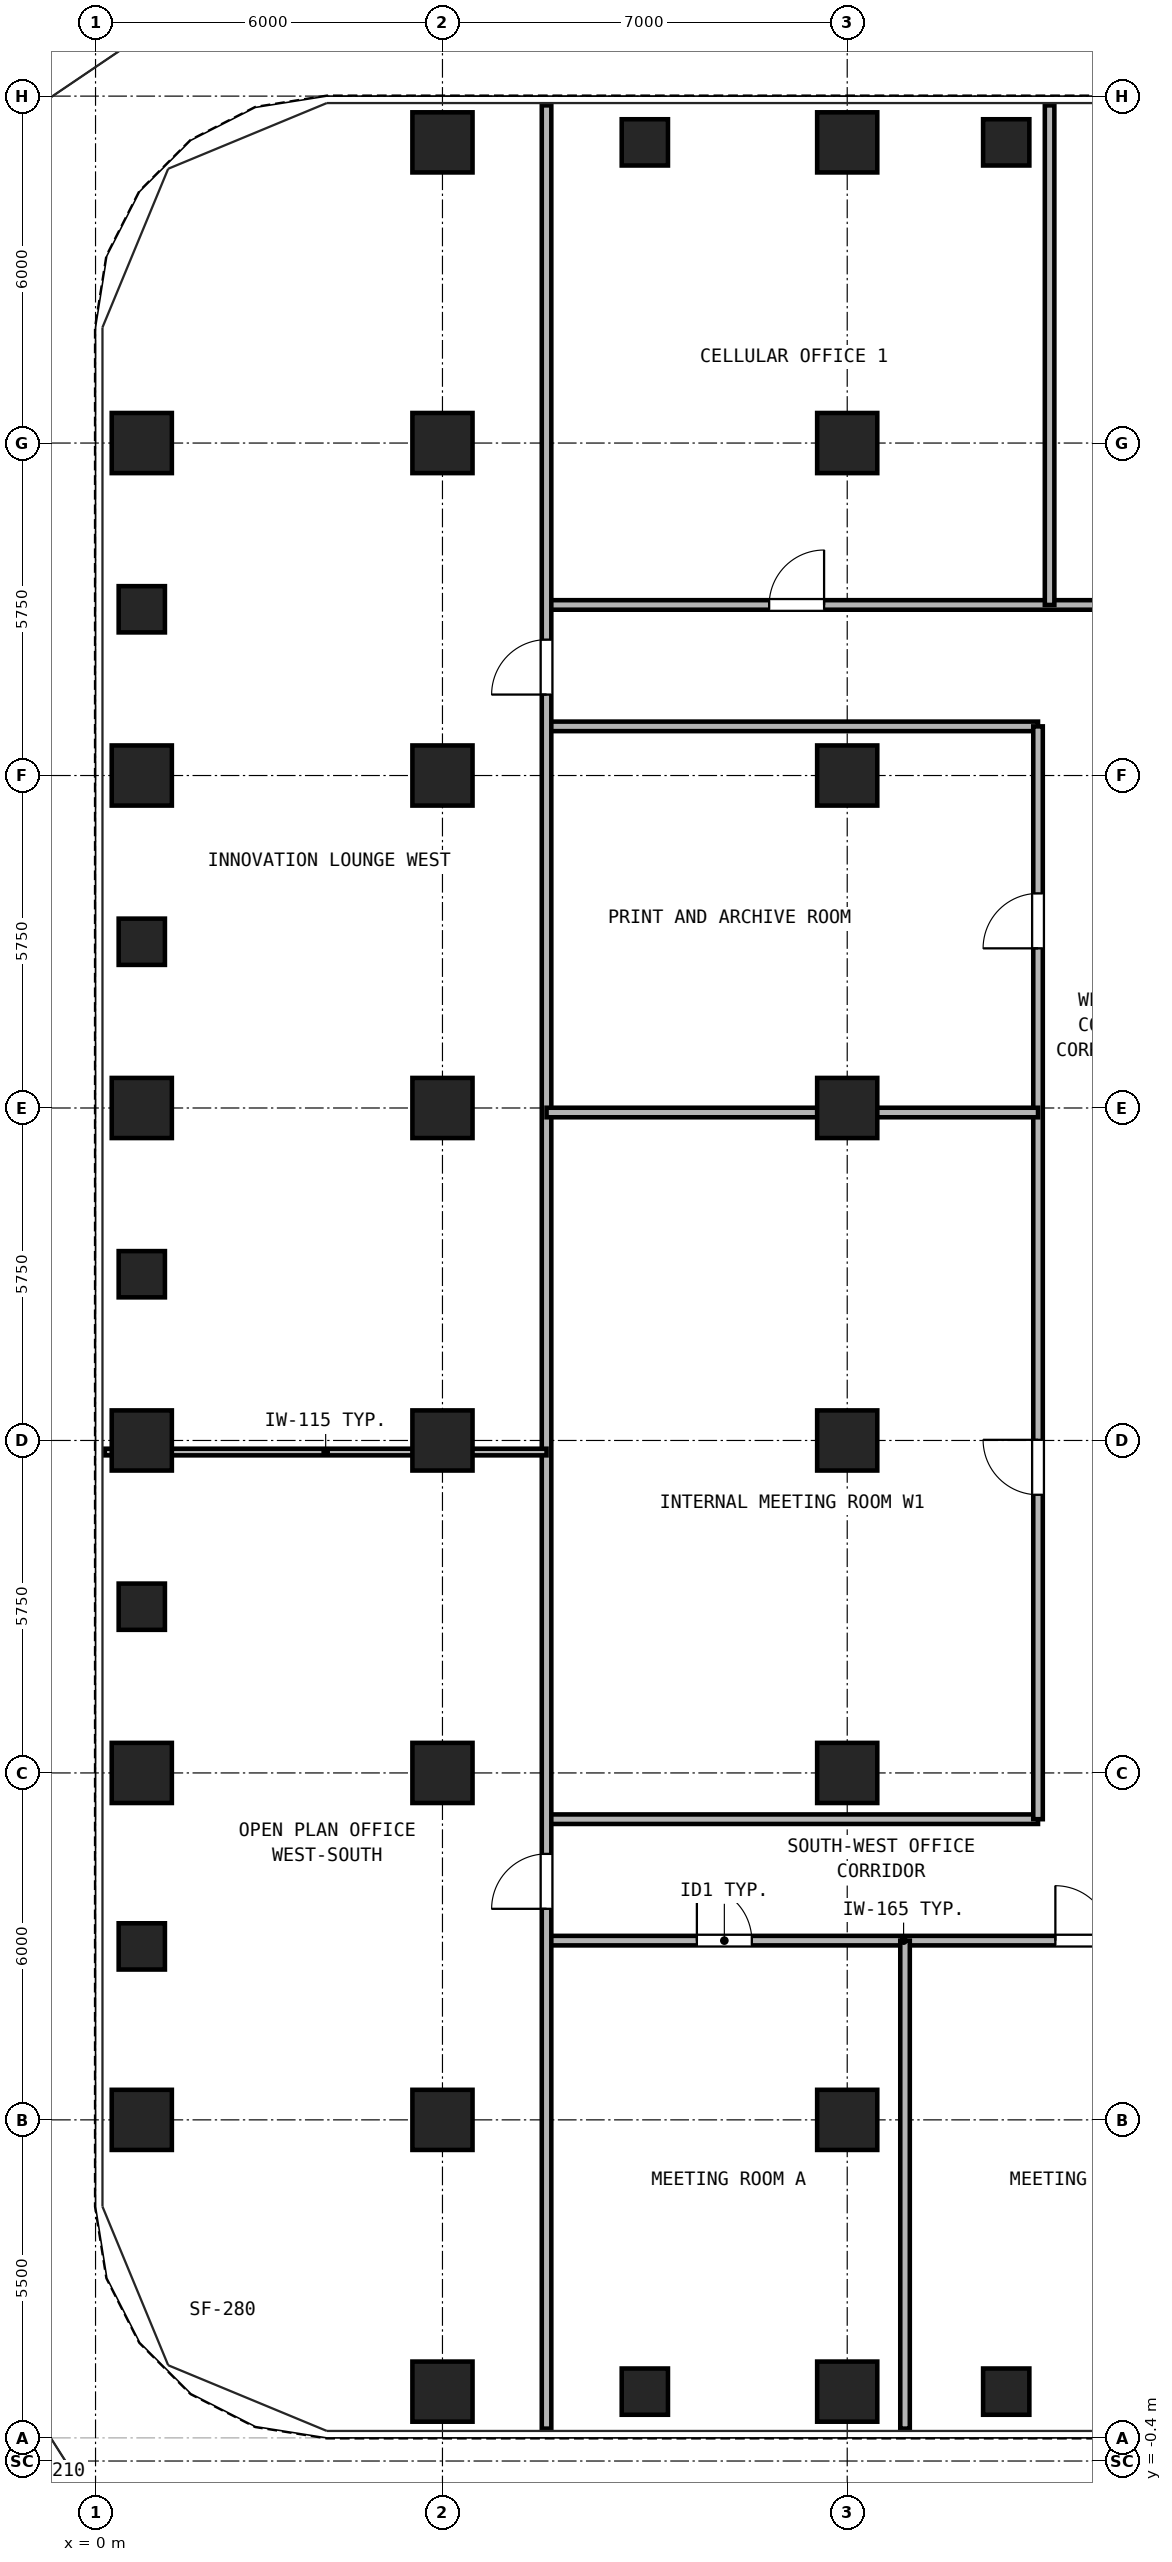
"""IFC4 building model, lengths in metres.
Left out: names, types, materials, properties, quantities, classifications, styles, units other than length and angle.
Written with IfcOpenShell. Run it as: python <this file> out.ifc"""

import sys

from ifc_helpers import new_model, si_unit, direction, frame, frame_2d, origin, origin_2d, place, context, subcontext, project, spatial, rectangle, hollow_rectangle, extrude, source, transform, mapped, element, fill, save


model = new_model("IFC4")
c1 = context("Model", 3, precision=1e-05, world=origin(), true_north=direction((0.0, 1.0)))
c2 = subcontext(c1, "Body", "Model", "MODEL_VIEW")
j1 = project(units=[si_unit("LENGTHUNIT", "METRE"), si_unit("PLANEANGLEUNIT", "RADIAN")], contexts=[c1])
p1 = place(None, origin())
s1 = spatial("IfcSite", under=j1, at=p1, CompositionType="ELEMENT")
p2 = place(p1, origin())
s2 = spatial("IfcBuilding", under=s1, at=p2, CompositionType="ELEMENT")
p3 = place(p2, frame((0.0, 0.0, 65.7)))
s3 = spatial("IfcBuildingStorey", under=s2, at=p3, CompositionType="ELEMENT", Elevation=65.7)
m1 = source(origin(), c2, "Body", "SweptSolid", [
    extrude(hollow_rectangle(XDim=1.04, YDim=1.04, WallThickness=0.065, at=origin_2d()), origin(), (0.0, 0.0, 1.0), 3.32),
])
for number, where, z_axis, x_axis in (
    (1, (6.0, 0.8, 0.0), (0.0, 0.0, 1.0), (1.0, 0.0, 0.0)),
    (2, (6.0, 39.7, 0.0), (0.0, 0.0, 1.0), (1.0, 0.0, 0.0)),
    (3, (13.0, 0.8, 0.0), (0.0, 0.0, 1.0), (1.0, 0.0, 0.0)),
    (4, (13.0, 39.7, 0.0), (0.0, 0.0, 1.0), (1.0, 0.0, 0.0)),
    (5, (0.8, 5.5, 0.0), (0.0, 0.0, 1.0), (1.0, 0.0, 0.0)),
    (6, (0.8, 11.5, 0.0), (0.0, 0.0, 1.0), (1.0, 0.0, 0.0)),
    (7, (0.8, 17.25, 0.0), (0.0, 0.0, 1.0), (1.0, 0.0, 0.0)),
    (8, (0.8, 23.0, 0.0), (0.0, 0.0, 1.0), (1.0, 0.0, 0.0)),
    (9, (0.8, 28.75, 0.0), (0.0, 0.0, 1.0), (1.0, 0.0, 0.0)),
    (10, (0.8, 34.5, 0.0), (0.0, 0.0, 1.0), (1.0, 0.0, 0.0)),
    (11, (6.0, 5.5, 0.0), (0.0, 0.0, 1.0), (1.0, 0.0, 0.0)),
    (12, (6.0, 11.5, 0.0), (0.0, 0.0, 1.0), (1.0, 0.0, 0.0)),
    (13, (6.0, 17.25, 0.0), (0.0, 0.0, 1.0), (1.0, 0.0, 0.0)),
    (14, (6.0, 23.0, 0.0), (0.0, 0.0, 1.0), (1.0, 0.0, 0.0)),
    (15, (6.0, 28.75, 0.0), (0.0, 0.0, 1.0), (1.0, 0.0, 0.0)),
    (16, (6.0, 34.5, 0.0), (0.0, 0.0, 1.0), (1.0, 0.0, 0.0)),
    (17, (13.0, 5.5, 0.0), (0.0, 0.0, 1.0), (1.0, 0.0, 0.0)),
    (18, (13.0, 11.5, 0.0), (0.0, 0.0, 1.0), (1.0, 0.0, 0.0)),
    (19, (13.0, 17.25, 0.0), (0.0, 0.0, 1.0), (1.0, 0.0, 0.0)),
    (20, (13.0, 23.0, 0.0), (0.0, 0.0, 1.0), (1.0, 0.0, 0.0)),
    (21, (13.0, 28.75, 0.0), (0.0, 0.0, 1.0), (1.0, 0.0, 0.0)),
    (22, (13.0, 34.5, 0.0), (0.0, 0.0, 1.0), (1.0, 0.0, 0.0)),
):
    element("IfcColumn", number, at=place(p3, frame(where, z_axis=z_axis, x_axis=x_axis)), inside=s3, PredefinedType="COLUMN", context=c2, shape_type="MappedRepresentation", body=[
        mapped(m1, transform((0.0, 0.0, 0.0), x_axis=(1.0, 0.0, 0.0), y_axis=(0.0, 1.0, 0.0), z_axis=(0.0, 0.0, 1.0), scale=1.0)),
    ])
m2 = source(origin(), c2, "Body", "SweptSolid", [
    extrude(hollow_rectangle(XDim=0.8, YDim=0.8, WallThickness=0.045, at=origin_2d()), origin(), (0.0, 0.0, 1.0), 3.32),
])
for number, where, z_axis, x_axis in (
    (23, (9.5, 0.8, 0.0), (0.0, 0.0, 1.0), (1.0, 0.0, 0.0)),
    (24, (9.5, 39.7, 0.0), (0.0, 0.0, 1.0), (1.0, 0.0, 0.0)),
    (25, (15.75, 0.8, 0.0), (0.0, 0.0, 1.0), (1.0, 0.0, 0.0)),
    (26, (15.75, 39.7, 0.0), (0.0, 0.0, 1.0), (1.0, 0.0, 0.0)),
    (27, (0.8, 8.5, 0.0), (0.0, 0.0, 1.0), (1.0, 0.0, 0.0)),
    (28, (0.8, 14.375, 0.0), (0.0, 0.0, 1.0), (1.0, 0.0, 0.0)),
    (29, (0.8, 20.125, 0.0), (0.0, 0.0, 1.0), (1.0, 0.0, 0.0)),
    (30, (0.8, 25.875, 0.0), (0.0, 0.0, 1.0), (1.0, 0.0, 0.0)),
    (31, (0.8, 31.625, 0.0), (0.0, 0.0, 1.0), (1.0, 0.0, 0.0)),
):
    element("IfcColumn", number, at=place(p3, frame(where, z_axis=z_axis, x_axis=x_axis)), inside=s3, PredefinedType="COLUMN", context=c2, shape_type="MappedRepresentation", body=[
        mapped(m2, transform((0.0, 0.0, 0.0), x_axis=(1.0, 0.0, 0.0), y_axis=(0.0, 1.0, 0.0), z_axis=(0.0, 0.0, 1.0), scale=1.0)),
    ])
p4 = place(p3, frame((7.8, 8.6, 0.0), z_axis=(0.0, 0.0, 1.0), x_axis=(1.0, 0.0, 0.0)))
e32 = element("IfcWall", 32, at=p4, inside=s3, PredefinedType="PARTITIONING", context=c2, shape_type="SweptSolid", body=[
    extrude(rectangle(XDim=31.4, YDim=0.165, at=frame_2d((15.7, 0.0))), origin(), (0.0, 0.0, 1.0), 2.898),
])
p5 = place(p4, frame((2.6, 0.0, 0.0)))
e33 = element("IfcOpeningElement", 33, at=p5, cuts=e32, PredefinedType="OPENING", context=c2, shape_type="SweptSolid", body=[
    extrude(rectangle(XDim=0.95, YDim=2.15, at=frame_2d((0.475, 1.075))), frame((0.0, 0.093, 0.0), z_axis=(0.0, -1.0, 0.0), x_axis=(1.0, 0.0, 0.0)), (0.0, 0.0, 1.0), 0.185),
])
p6 = place(p4, frame((8.8, 0.0, 0.0)))
e34 = element("IfcOpeningElement", 34, at=p6, cuts=e32, PredefinedType="OPENING", context=c2, shape_type="SweptSolid", body=[
    extrude(rectangle(XDim=0.95, YDim=2.15, at=frame_2d((0.475, 1.075))), frame((0.0, 0.093, 0.0), z_axis=(0.0, -1.0, 0.0), x_axis=(1.0, 0.0, 0.0)), (0.0, 0.0, 1.0), 0.185),
])
p7 = place(p4, frame((15.0, 0.0, 0.0)))
e35 = element("IfcOpeningElement", 35, at=p7, cuts=e32, PredefinedType="OPENING", context=c2, shape_type="SweptSolid", body=[
    extrude(rectangle(XDim=0.95, YDim=2.15, at=frame_2d((0.475, 1.075))), frame((0.0, 0.093, 0.0), z_axis=(0.0, -1.0, 0.0), x_axis=(1.0, 0.0, 0.0)), (0.0, 0.0, 1.0), 0.185),
])
p8 = place(p4, frame((21.2, 0.0, 0.0)))
e36 = element("IfcOpeningElement", 36, at=p8, cuts=e32, PredefinedType="OPENING", context=c2, shape_type="SweptSolid", body=[
    extrude(rectangle(XDim=0.95, YDim=2.15, at=frame_2d((0.475, 1.075))), frame((0.0, 0.093, 0.0), z_axis=(0.0, -1.0, 0.0), x_axis=(1.0, 0.0, 0.0)), (0.0, 0.0, 1.0), 0.185),
])
p9 = place(p4, frame((26.2, 0.0, 0.0)))
e37 = element("IfcOpeningElement", 37, at=p9, cuts=e32, PredefinedType="OPENING", context=c2, shape_type="SweptSolid", body=[
    extrude(rectangle(XDim=0.95, YDim=2.15, at=frame_2d((0.475, 1.075))), frame((0.0, 0.093, 0.0), z_axis=(0.0, -1.0, 0.0), x_axis=(1.0, 0.0, 0.0)), (0.0, 0.0, 1.0), 0.185),
])
p10 = place(p4, frame((29.5, 0.0, 0.0)))
e38 = element("IfcOpeningElement", 38, at=p10, cuts=e32, PredefinedType="OPENING", context=c2, shape_type="SweptSolid", body=[
    extrude(rectangle(XDim=0.92, YDim=2.1, at=frame_2d((0.46, 1.05))), frame((0.0, 0.093, 0.0), z_axis=(0.0, -1.0, 0.0), x_axis=(1.0, 0.0, 0.0)), (0.0, 0.0, 1.0), 0.185),
])
p11 = place(p3, frame((7.8, 31.7, 0.0), z_axis=(0.0, 0.0, 1.0), x_axis=(1.0, 0.0, 0.0)))
e39 = element("IfcWall", 39, at=p11, inside=s3, PredefinedType="PARTITIONING", context=c2, shape_type="SweptSolid", body=[
    extrude(rectangle(XDim=31.4, YDim=0.165, at=frame_2d((15.7, 0.0))), origin(), (0.0, 0.0, 1.0), 2.898),
])
p12 = place(p11, frame((3.85, 0.0, 0.0)))
e40 = element("IfcOpeningElement", 40, at=p12, cuts=e39, PredefinedType="OPENING", context=c2, shape_type="SweptSolid", body=[
    extrude(rectangle(XDim=0.95, YDim=2.15, at=frame_2d((0.475, 1.075))), frame((0.0, 0.093, 0.0), z_axis=(0.0, -1.0, 0.0), x_axis=(1.0, 0.0, 0.0)), (0.0, 0.0, 1.0), 0.185),
])
p13 = place(p11, frame((12.2, 0.0, 0.0)))
e41 = element("IfcOpeningElement", 41, at=p13, cuts=e39, PredefinedType="OPENING", context=c2, shape_type="SweptSolid", body=[
    extrude(rectangle(XDim=0.95, YDim=2.15, at=frame_2d((0.475, 1.075))), frame((0.0, 0.093, 0.0), z_axis=(0.0, -1.0, 0.0), x_axis=(1.0, 0.0, 0.0)), (0.0, 0.0, 1.0), 0.185),
])
p14 = place(p11, frame((20.2, 0.0, 0.0)))
e42 = element("IfcOpeningElement", 42, at=p14, cuts=e39, PredefinedType="OPENING", context=c2, shape_type="SweptSolid", body=[
    extrude(rectangle(XDim=0.95, YDim=2.15, at=frame_2d((0.475, 1.075))), frame((0.0, 0.093, 0.0), z_axis=(0.0, -1.0, 0.0), x_axis=(1.0, 0.0, 0.0)), (0.0, 0.0, 1.0), 0.185),
])
p15 = place(p11, frame((27.55, 0.0, 0.0)))
e43 = element("IfcOpeningElement", 43, at=p15, cuts=e39, PredefinedType="OPENING", context=c2, shape_type="SweptSolid", body=[
    extrude(rectangle(XDim=0.92, YDim=2.1, at=frame_2d((0.46, 1.05))), frame((0.0, 0.093, 0.0), z_axis=(0.0, -1.0, 0.0), x_axis=(1.0, 0.0, 0.0)), (0.0, 0.0, 1.0), 0.185),
])
for number, where, z_axis, x_axis in (
    (44, (7.8, 10.7, 0.0), (0.0, 0.0, 1.0), (1.0, 0.0, 0.0)),
    (45, (7.8, 29.6, 0.0), (0.0, 0.0, 1.0), (1.0, 0.0, 0.0)),
):
    element("IfcWall", number, at=place(p3, frame(where, z_axis=z_axis, x_axis=x_axis)), inside=s3, PredefinedType="PARTITIONING", context=c2, shape_type="SweptSolid", body=[
        extrude(rectangle(XDim=8.5, YDim=0.165, at=frame_2d((4.25, 0.0))), origin(), (0.0, 0.0, 1.0), 3.32),
    ])
p16 = place(p3, frame((16.3, 10.7, 0.0), z_axis=(0.0, 0.0, 1.0), x_axis=(0.0, 1.0, 0.0)))
e46 = element("IfcWall", 46, at=p16, inside=s3, PredefinedType="PARTITIONING", context=c2, shape_type="SweptSolid", body=[
    extrude(rectangle(XDim=18.9, YDim=0.165, at=frame_2d((9.45, 0.0))), origin(), (0.0, 0.0, 1.0), 3.32),
])
p17 = place(p16, frame((5.611, 0.0, 0.0)))
e47 = element("IfcOpeningElement", 47, at=p17, cuts=e46, PredefinedType="OPENING", context=c2, shape_type="SweptSolid", body=[
    extrude(rectangle(XDim=0.95, YDim=2.15, at=frame_2d((0.475, 1.075))), frame((0.0, 0.093, 0.0), z_axis=(0.0, -1.0, 0.0), x_axis=(1.0, 0.0, 0.0)), (0.0, 0.0, 1.0), 0.185),
])
p18 = place(p16, frame((15.061, 0.0, 0.0)))
e48 = element("IfcOpeningElement", 48, at=p18, cuts=e46, PredefinedType="OPENING", context=c2, shape_type="SweptSolid", body=[
    extrude(rectangle(XDim=0.95, YDim=2.15, at=frame_2d((0.475, 1.075))), frame((0.0, 0.093, 0.0), z_axis=(0.0, -1.0, 0.0), x_axis=(1.0, 0.0, 0.0)), (0.0, 0.0, 1.0), 0.185),
])
p19 = place(p3, frame((7.8, 0.16, 0.0), z_axis=(0.0, 0.0, 1.0), x_axis=(0.0, 1.0, 0.0)))
e49 = element("IfcWall", 49, at=p19, inside=s3, PredefinedType="PARTITIONING", context=c2, shape_type="SweptSolid", body=[
    extrude(rectangle(XDim=40.18, YDim=0.165, at=frame_2d((20.09, 0.0))), origin(), (0.0, 0.0, 1.0), 3.32),
])
p20 = place(p19, frame((8.99, 0.0, 0.0)))
e50 = element("IfcOpeningElement", 50, at=p20, cuts=e49, PredefinedType="OPENING", context=c2, shape_type="SweptSolid", body=[
    extrude(rectangle(XDim=0.95, YDim=2.15, at=frame_2d((0.475, 1.075))), frame((0.0, 0.093, 0.0), z_axis=(0.0, -1.0, 0.0), x_axis=(1.0, 0.0, 0.0)), (0.0, 0.0, 1.0), 0.185),
])
p21 = place(p19, frame((29.99, 0.0, 0.0)))
e51 = element("IfcOpeningElement", 51, at=p21, cuts=e49, PredefinedType="OPENING", context=c2, shape_type="SweptSolid", body=[
    extrude(rectangle(XDim=0.95, YDim=2.15, at=frame_2d((0.475, 1.075))), frame((0.0, 0.093, 0.0), z_axis=(0.0, -1.0, 0.0), x_axis=(1.0, 0.0, 0.0)), (0.0, 0.0, 1.0), 0.185),
])
p22 = place(p3, frame((14.0, 0.16, 0.0), z_axis=(0.0, 0.0, 1.0), x_axis=(0.0, 1.0, 0.0)))
e52 = element("IfcWall", 52, at=p22, inside=s3, PredefinedType="PARTITIONING", context=c2, shape_type="SweptSolid", body=[
    extrude(rectangle(XDim=8.44, YDim=0.165, at=frame_2d((4.22, 0.0))), origin(), (0.0, 0.0, 1.0), 3.32),
])
p23 = place(p3, frame((16.5, 31.7, 0.0), z_axis=(0.0, 0.0, 1.0), x_axis=(0.0, 1.0, 0.0)))
e53 = element("IfcWall", 53, at=p23, inside=s3, PredefinedType="PARTITIONING", context=c2, shape_type="SweptSolid", body=[
    extrude(rectangle(XDim=8.64, YDim=0.165, at=frame_2d((4.32, 0.0))), origin(), (0.0, 0.0, 1.0), 3.32),
])
p24 = place(p3, frame((0.16, 17.05, 0.0), z_axis=(0.0, 0.0, 1.0), x_axis=(1.0, 0.0, 0.0)))
e54 = element("IfcWall", 54, at=p24, inside=s3, PredefinedType="PARTITIONING", context=c2, shape_type="SweptSolid", body=[
    extrude(rectangle(XDim=7.64, YDim=0.115, at=frame_2d((3.82, 0.0))), origin(), (0.0, 0.0, 1.0), 2.539),
])
p25 = place(p3, frame((7.8, 22.922, 0.0), z_axis=(0.0, 0.0, 1.0), x_axis=(1.0, 0.0, 0.0)))
e55 = element("IfcWall", 55, at=p25, inside=s3, PredefinedType="PARTITIONING", context=c2, shape_type="SweptSolid", body=[
    extrude(rectangle(XDim=8.5, YDim=0.165, at=frame_2d((4.25, 0.0))), origin(), (0.0, 0.0, 1.0), 2.539),
])
p26 = place(p5, frame((0.95, 0.0, 0.0), z_axis=(0.0, 0.0, 1.0), x_axis=(-1.0, 0.0, 0.0)))
e56 = element("IfcDoor", 56, at=p26, inside=s3, OperationType="SINGLE_SWING_LEFT", PredefinedType="DOOR", context=c2, shape_type="SweptSolid", body=[
    extrude(rectangle(XDim=0.95, YDim=2.15, at=frame_2d((0.475, 1.075))), frame((0.0, 0.025, 0.0), z_axis=(0.0, -1.0, 0.0), x_axis=(1.0, 0.0, 0.0)), (0.0, 0.0, 1.0), 0.05),
])
fill(e33, e56)
p27 = place(p6, frame((0.95, 0.0, 0.0), z_axis=(0.0, 0.0, 1.0), x_axis=(-1.0, 0.0, 0.0)))
e57 = element("IfcDoor", 57, at=p27, inside=s3, OperationType="SINGLE_SWING_LEFT", PredefinedType="DOOR", context=c2, shape_type="SweptSolid", body=[
    extrude(rectangle(XDim=0.95, YDim=2.15, at=frame_2d((0.475, 1.075))), frame((0.0, 0.025, 0.0), z_axis=(0.0, -1.0, 0.0), x_axis=(1.0, 0.0, 0.0)), (0.0, 0.0, 1.0), 0.05),
])
fill(e34, e57)
p28 = place(p12, origin())
e58 = element("IfcDoor", 58, at=p28, inside=s3, OperationType="SINGLE_SWING_RIGHT", PredefinedType="DOOR", context=c2, shape_type="SweptSolid", body=[
    extrude(rectangle(XDim=0.95, YDim=2.15, at=frame_2d((0.475, 1.075))), frame((0.0, 0.025, 0.0), z_axis=(0.0, -1.0, 0.0), x_axis=(1.0, 0.0, 0.0)), (0.0, 0.0, 1.0), 0.05),
])
fill(e40, e58)
p29 = place(p20, frame((0.95, 0.0, 0.0), z_axis=(0.0, 0.0, 1.0), x_axis=(-1.0, 0.0, 0.0)))
e59 = element("IfcDoor", 59, at=p29, inside=s3, OperationType="SINGLE_SWING_LEFT", PredefinedType="DOOR", context=c2, shape_type="SweptSolid", body=[
    extrude(rectangle(XDim=0.95, YDim=2.15, at=frame_2d((0.475, 1.075))), frame((0.0, 0.025, 0.0), z_axis=(0.0, -1.0, 0.0), x_axis=(1.0, 0.0, 0.0)), (0.0, 0.0, 1.0), 0.05),
])
fill(e50, e59)
p30 = place(p21, frame((0.95, 0.0, 0.0), z_axis=(0.0, 0.0, 1.0), x_axis=(-1.0, 0.0, 0.0)))
e60 = element("IfcDoor", 60, at=p30, inside=s3, OperationType="SINGLE_SWING_LEFT", PredefinedType="DOOR", context=c2, shape_type="SweptSolid", body=[
    extrude(rectangle(XDim=0.95, YDim=2.15, at=frame_2d((0.475, 1.075))), frame((0.0, 0.025, 0.0), z_axis=(0.0, -1.0, 0.0), x_axis=(1.0, 0.0, 0.0)), (0.0, 0.0, 1.0), 0.05),
])
fill(e51, e60)
p31 = place(p17, frame((0.95, 0.0, 0.0), z_axis=(0.0, 0.0, 1.0), x_axis=(-1.0, 0.0, 0.0)))
e61 = element("IfcDoor", 61, at=p31, inside=s3, OperationType="SINGLE_SWING_RIGHT", PredefinedType="DOOR", context=c2, shape_type="SweptSolid", body=[
    extrude(rectangle(XDim=0.95, YDim=2.15, at=frame_2d((0.475, 1.075))), frame((0.0, 0.025, 0.0), z_axis=(0.0, -1.0, 0.0), x_axis=(1.0, 0.0, 0.0)), (0.0, 0.0, 1.0), 0.05),
])
fill(e47, e61)
p32 = place(p18, frame((0.95, 0.0, 0.0), z_axis=(0.0, 0.0, 1.0), x_axis=(-1.0, 0.0, 0.0)))
e62 = element("IfcDoor", 62, at=p32, inside=s3, OperationType="SINGLE_SWING_LEFT", PredefinedType="DOOR", context=c2, shape_type="SweptSolid", body=[
    extrude(rectangle(XDim=0.95, YDim=2.15, at=frame_2d((0.475, 1.075))), frame((0.0, 0.025, 0.0), z_axis=(0.0, -1.0, 0.0), x_axis=(1.0, 0.0, 0.0)), (0.0, 0.0, 1.0), 0.05),
])
fill(e48, e62)
save(model, sys.argv[1])
